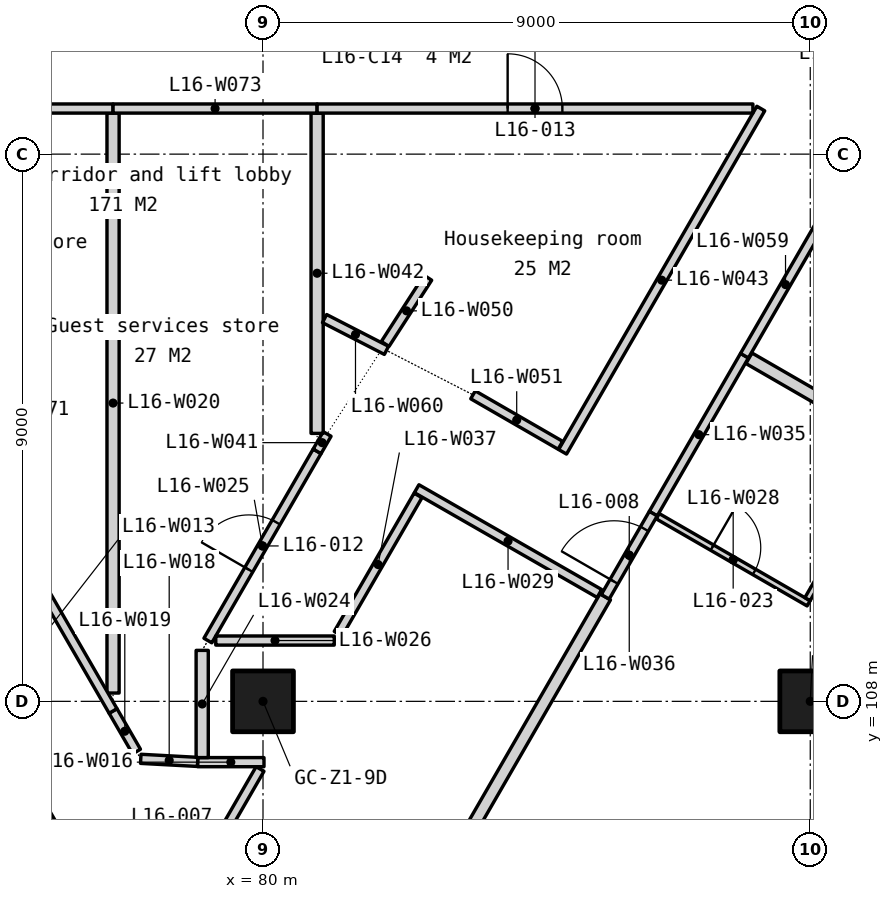
"""IFC4 building model, lengths in metres.
Left out: names, types, materials, properties, quantities, classifications, styles, units other than length and angle.
Written with IfcOpenShell. Run it as: python <this file> out.ifc"""

import sys

from ifc_helpers import new_model, si_unit, direction, frame, frame_2d, origin, origin_2d, place, context, subcontext, project, spatial, polyline, rectangle, outline, extrude, element, fill, save


model = new_model("IFC4")
c1 = context("Model", 3, precision=1e-05, world=origin(), true_north=direction((0.0, 1.0)))
c2 = subcontext(c1, "Body", "Model", "MODEL_VIEW")
j1 = project(units=[si_unit("LENGTHUNIT", "METRE"), si_unit("PLANEANGLEUNIT", "RADIAN")], contexts=[c1])
p1 = place(None, origin())
s1 = spatial("IfcSite", under=j1, at=p1, CompositionType="ELEMENT")
p2 = place(p1, origin())
s2 = spatial("IfcBuilding", under=s1, at=p2, CompositionType="ELEMENT")
p3 = place(p2, frame((0.0, 0.0, 70.0)))
s3 = spatial("IfcBuildingStorey", under=s2, at=p3, CompositionType="ELEMENT", Elevation=70.0)
for number, where, z_axis, x_axis in (
    (1, (80.0, 108.0, 0.0), (0.0, 0.0, 1.0), (1.0, 0.0, 0.0)),
    (2, (89.0, 108.0, 0.0), (0.0, 0.0, 1.0), (1.0, 0.0, 0.0)),
):
    element("IfcColumn", number, at=place(p3, frame(where, z_axis=z_axis, x_axis=x_axis)), inside=s3, PredefinedType="COLUMN", context=c2, shape_type="SweptSolid", body=[
        extrude(rectangle(XDim=1.0, YDim=1.0, at=origin_2d()), origin(), (0.0, 0.0, 1.0), 3.5),
    ])
p4 = place(p3, frame((54.495, 129.397, -0.15), z_axis=(0.0, 0.0, 1.0), x_axis=(0.499999201451, -0.866025864826, 0.0)))
e3 = element("IfcWall", 3, at=p4, inside=s3, PredefinedType="SOLIDWALL", context=c2, shape_type="SweptSolid", body=[
    extrude(outline(polyline([(44.8, 0.0), (44.8, 3.5), (0.0, 3.5), (0.0, 0.0), (44.8, 0.0)])), frame((0.0, 0.225, 0.0), z_axis=(0.0, -1.0, 0.0), x_axis=(1.0, 0.0, 0.0)), (0.0, 0.0, 1.0), 0.45),
])
p5 = place(p4, frame((0.786, 0.0, 1.05)))
e4 = element("IfcOpeningElement", 4, at=p5, cuts=e3, PredefinedType="OPENING", context=c2, shape_type="SweptSolid", body=[
    extrude(rectangle(XDim=1.2, YDim=1.5, at=frame_2d((0.6, 0.75))), frame((0.0, 0.235, 0.0), z_axis=(0.0, -1.0, 0.0), x_axis=(1.0, 0.0, 0.0)), (0.0, 0.0, 1.0), 0.47),
])
p6 = place(p4, frame((6.91, 0.0, 1.05)))
e5 = element("IfcOpeningElement", 5, at=p6, cuts=e3, PredefinedType="OPENING", context=c2, shape_type="SweptSolid", body=[
    extrude(rectangle(XDim=1.8, YDim=1.5, at=frame_2d((0.9, 0.75))), frame((0.0, 0.235, 0.0), z_axis=(0.0, -1.0, 0.0), x_axis=(1.0, 0.0, 0.0)), (0.0, 0.0, 1.0), 0.47),
])
p7 = place(p4, frame((9.21, 0.0, 1.05)))
e6 = element("IfcOpeningElement", 6, at=p7, cuts=e3, PredefinedType="OPENING", context=c2, shape_type="SweptSolid", body=[
    extrude(rectangle(XDim=1.8, YDim=1.5, at=frame_2d((0.9, 0.75))), frame((0.0, 0.235, 0.0), z_axis=(0.0, -1.0, 0.0), x_axis=(1.0, 0.0, 0.0)), (0.0, 0.0, 1.0), 0.47),
])
p8 = place(p4, frame((15.87, 0.0, 1.05)))
e7 = element("IfcOpeningElement", 7, at=p8, cuts=e3, PredefinedType="OPENING", context=c2, shape_type="SweptSolid", body=[
    extrude(rectangle(XDim=1.8, YDim=1.5, at=frame_2d((0.9, 0.75))), frame((0.0, 0.235, 0.0), z_axis=(0.0, -1.0, 0.0), x_axis=(1.0, 0.0, 0.0)), (0.0, 0.0, 1.0), 0.47),
])
p9 = place(p4, frame((18.17, 0.0, 1.05)))
e8 = element("IfcOpeningElement", 8, at=p9, cuts=e3, PredefinedType="OPENING", context=c2, shape_type="SweptSolid", body=[
    extrude(rectangle(XDim=1.8, YDim=1.5, at=frame_2d((0.9, 0.75))), frame((0.0, 0.235, 0.0), z_axis=(0.0, -1.0, 0.0), x_axis=(1.0, 0.0, 0.0)), (0.0, 0.0, 1.0), 0.47),
])
p10 = place(p4, frame((24.83, 0.0, 1.05)))
e9 = element("IfcOpeningElement", 9, at=p10, cuts=e3, PredefinedType="OPENING", context=c2, shape_type="SweptSolid", body=[
    extrude(rectangle(XDim=1.8, YDim=1.5, at=frame_2d((0.9, 0.75))), frame((0.0, 0.235, 0.0), z_axis=(0.0, -1.0, 0.0), x_axis=(1.0, 0.0, 0.0)), (0.0, 0.0, 1.0), 0.47),
])
p11 = place(p4, frame((27.13, 0.0, 1.05)))
e10 = element("IfcOpeningElement", 10, at=p11, cuts=e3, PredefinedType="OPENING", context=c2, shape_type="SweptSolid", body=[
    extrude(rectangle(XDim=1.8, YDim=1.5, at=frame_2d((0.9, 0.75))), frame((0.0, 0.235, 0.0), z_axis=(0.0, -1.0, 0.0), x_axis=(1.0, 0.0, 0.0)), (0.0, 0.0, 1.0), 0.47),
])
p12 = place(p4, frame((33.79, 0.0, 1.05)))
e11 = element("IfcOpeningElement", 11, at=p12, cuts=e3, PredefinedType="OPENING", context=c2, shape_type="SweptSolid", body=[
    extrude(rectangle(XDim=1.8, YDim=1.5, at=frame_2d((0.9, 0.75))), frame((0.0, 0.235, 0.0), z_axis=(0.0, -1.0, 0.0), x_axis=(1.0, 0.0, 0.0)), (0.0, 0.0, 1.0), 0.47),
])
p13 = place(p4, frame((36.09, 0.0, 1.05)))
e12 = element("IfcOpeningElement", 12, at=p13, cuts=e3, PredefinedType="OPENING", context=c2, shape_type="SweptSolid", body=[
    extrude(rectangle(XDim=1.8, YDim=1.5, at=frame_2d((0.9, 0.75))), frame((0.0, 0.235, 0.0), z_axis=(0.0, -1.0, 0.0), x_axis=(1.0, 0.0, 0.0)), (0.0, 0.0, 1.0), 0.47),
])
p14 = place(p4, frame((42.814, 0.0, 1.05)))
e13 = element("IfcOpeningElement", 13, at=p14, cuts=e3, PredefinedType="OPENING", context=c2, shape_type="SweptSolid", body=[
    extrude(rectangle(XDim=1.2, YDim=1.5, at=frame_2d((0.6, 0.75))), frame((0.0, 0.235, 0.0), z_axis=(0.0, -1.0, 0.0), x_axis=(1.0, 0.0, 0.0)), (0.0, 0.0, 1.0), 0.47),
])
p15 = place(p3, frame((88.435, 99.831, -0.15), z_axis=(0.0, 0.0, 1.0), x_axis=(0.500000806382, 0.866024938219, 0.0)))
e14 = element("IfcWall", 14, at=p15, inside=s3, PredefinedType="SOLIDWALL", context=c2, shape_type="SweptSolid", body=[
    extrude(outline(polyline([(34.14, 3.5), (34.14, 0.0), (0.0, 0.0), (0.0, 3.5), (34.14, 3.5)])), frame((0.0, 0.225, 0.0), z_axis=(0.0, -1.0, 0.0), x_axis=(1.0, 0.0, 0.0)), (0.0, 0.0, 1.0), 0.45),
])
p16 = place(p15, frame((5.21, 0.0, 1.05)))
e15 = element("IfcOpeningElement", 15, at=p16, cuts=e14, PredefinedType="OPENING", context=c2, shape_type="SweptSolid", body=[
    extrude(rectangle(XDim=1.8, YDim=1.5, at=frame_2d((0.9, 0.75))), frame((0.0, 0.235, 0.0), z_axis=(0.0, -1.0, 0.0), x_axis=(1.0, 0.0, 0.0)), (0.0, 0.0, 1.0), 0.47),
])
p17 = place(p15, frame((7.51, 0.0, 1.05)))
e16 = element("IfcOpeningElement", 16, at=p17, cuts=e14, PredefinedType="OPENING", context=c2, shape_type="SweptSolid", body=[
    extrude(rectangle(XDim=1.8, YDim=1.5, at=frame_2d((0.9, 0.75))), frame((0.0, 0.235, 0.0), z_axis=(0.0, -1.0, 0.0), x_axis=(1.0, 0.0, 0.0)), (0.0, 0.0, 1.0), 0.47),
])
p18 = place(p15, frame((14.17, 0.0, 1.05)))
e17 = element("IfcOpeningElement", 17, at=p18, cuts=e14, PredefinedType="OPENING", context=c2, shape_type="SweptSolid", body=[
    extrude(rectangle(XDim=1.8, YDim=1.5, at=frame_2d((0.9, 0.75))), frame((0.0, 0.235, 0.0), z_axis=(0.0, -1.0, 0.0), x_axis=(1.0, 0.0, 0.0)), (0.0, 0.0, 1.0), 0.47),
])
p19 = place(p15, frame((16.47, 0.0, 1.05)))
e18 = element("IfcOpeningElement", 18, at=p19, cuts=e14, PredefinedType="OPENING", context=c2, shape_type="SweptSolid", body=[
    extrude(rectangle(XDim=1.8, YDim=1.5, at=frame_2d((0.9, 0.75))), frame((0.0, 0.235, 0.0), z_axis=(0.0, -1.0, 0.0), x_axis=(1.0, 0.0, 0.0)), (0.0, 0.0, 1.0), 0.47),
])
p20 = place(p15, frame((23.13, 0.0, 1.05)))
e19 = element("IfcOpeningElement", 19, at=p20, cuts=e14, PredefinedType="OPENING", context=c2, shape_type="SweptSolid", body=[
    extrude(rectangle(XDim=1.8, YDim=1.5, at=frame_2d((0.9, 0.75))), frame((0.0, 0.235, 0.0), z_axis=(0.0, -1.0, 0.0), x_axis=(1.0, 0.0, 0.0)), (0.0, 0.0, 1.0), 0.47),
])
p21 = place(p15, frame((25.43, 0.0, 1.05)))
e20 = element("IfcOpeningElement", 20, at=p21, cuts=e14, PredefinedType="OPENING", context=c2, shape_type="SweptSolid", body=[
    extrude(rectangle(XDim=1.8, YDim=1.5, at=frame_2d((0.9, 0.75))), frame((0.0, 0.235, 0.0), z_axis=(0.0, -1.0, 0.0), x_axis=(1.0, 0.0, 0.0)), (0.0, 0.0, 1.0), 0.47),
])
p22 = place(p15, frame((32.154, 0.0, 1.05)))
e21 = element("IfcOpeningElement", 21, at=p22, cuts=e14, PredefinedType="OPENING", context=c2, shape_type="SweptSolid", body=[
    extrude(rectangle(XDim=1.2, YDim=1.5, at=frame_2d((0.6, 0.75))), frame((0.0, 0.235, 0.0), z_axis=(0.0, -1.0, 0.0), x_axis=(1.0, 0.0, 0.0)), (0.0, 0.0, 1.0), 0.47),
])
p23 = place(p3, frame((80.087, 100.121, 0.0), z_axis=(0.0, 0.0, 1.0), x_axis=(0.500000851129, 0.866024912384, 0.0)))
e22 = element("IfcWall", 22, at=p23, inside=s3, PredefinedType="PARTITIONING", context=c2, shape_type="SweptSolid", body=[
    extrude(rectangle(XDim=11.083, YDim=0.2, at=frame_2d((5.542, 0.0))), origin(), (0.0, 0.0, 1.0), 3.35),
])
p24 = place(p3, frame((74.322, 109.805, 0.0), z_axis=(0.0, 0.0, 1.0), x_axis=(0.500013360201, -0.866017690131, 0.0)))
e23 = element("IfcWall", 23, at=p24, inside=s3, PredefinedType="PARTITIONING", context=c2, shape_type="SweptSolid", body=[
    extrude(rectangle(XDim=4.48, YDim=0.15, at=frame_2d((2.24, 0.0))), origin(), (0.0, 0.0, 1.0), 3.35),
])
p25 = place(p24, frame((0.896, 0.0, 0.0)))
e24 = element("IfcOpeningElement", 24, at=p25, cuts=e23, PredefinedType="OPENING", context=c2, shape_type="SweptSolid", body=[
    extrude(rectangle(XDim=0.9, YDim=2.1, at=frame_2d((0.45, 1.05))), frame((0.0, 0.085, 0.0), z_axis=(0.0, -1.0, 0.0), x_axis=(1.0, 0.0, 0.0)), (0.0, 0.0, 1.0), 0.17),
])
p26 = place(p3, frame((78.925, 107.0, 0.0), z_axis=(0.0, 0.0, 1.0), x_axis=(1.0, 0.0, 0.0)))
e25 = element("IfcWall", 25, at=p26, inside=s3, PredefinedType="PARTITIONING", context=c2, shape_type="SweptSolid", body=[
    extrude(rectangle(XDim=1.091, YDim=0.15, at=frame_2d((0.545, 0.0))), origin(), (0.0, 0.0, 1.0), 3.35),
])
p27 = place(p3, frame((78.044, 103.583, 0.0), z_axis=(0.0, 0.0, 1.0), x_axis=(0.499835090783, 0.866120593233, 0.0)))
e26 = element("IfcWall", 26, at=p27, inside=s3, PredefinedType="PARTITIONING", context=c2, shape_type="SweptSolid", body=[
    extrude(rectangle(XDim=3.815, YDim=0.15, at=frame_2d((1.908, 0.0))), origin(), (0.0, 0.0, 1.0), 3.35),
])
p28 = place(p27, frame((1.408, 0.0, 0.0)))
e27 = element("IfcOpeningElement", 27, at=p28, cuts=e26, PredefinedType="OPENING", context=c2, shape_type="SweptSolid", body=[
    extrude(rectangle(XDim=1.0, YDim=2.1, at=frame_2d((0.5, 1.05))), frame((0.0, 0.085, 0.0), z_axis=(0.0, -1.0, 0.0), x_axis=(1.0, 0.0, 0.0)), (0.0, 0.0, 1.0), 0.17),
])
p29 = place(p3, frame((77.99, 107.055, 0.0), z_axis=(0.0, 0.0, 1.0), x_axis=(0.998544170551, -0.053940147, 0.0)))
e28 = element("IfcWall", 28, at=p29, inside=s3, PredefinedType="PARTITIONING", context=c2, shape_type="SweptSolid", body=[
    extrude(rectangle(XDim=0.937, YDim=0.15, at=frame_2d((0.469, 0.0))), origin(), (0.0, 0.0, 1.0), 3.35),
])
p30 = place(p3, frame((77.534, 107.842, 0.0), z_axis=(0.0, 0.0, 1.0), x_axis=(0.500973854789, -0.865462417912, 0.0)))
e29 = element("IfcWall", 29, at=p30, inside=s3, PredefinedType="PARTITIONING", context=c2, shape_type="SweptSolid", body=[
    extrude(rectangle(XDim=0.771, YDim=0.15, at=frame_2d((0.385, 0.0))), origin(), (0.0, 0.0, 1.0), 3.35),
])
p31 = place(p3, frame((77.534, 108.137, 0.0), z_axis=(0.0, 0.0, 1.0), x_axis=(0.0, 1.0, 0.0)))
e30 = element("IfcWall", 30, at=p31, inside=s3, PredefinedType="PARTITIONING", context=c2, shape_type="SweptSolid", body=[
    extrude(rectangle(XDim=9.538, YDim=0.2, at=frame_2d((4.769, 0.0))), origin(), (0.0, 0.0, 1.0), 3.35),
])
p32 = place(p3, frame((79.0, 107.075, 0.0), z_axis=(0.0, 0.0, 1.0), x_axis=(0.0, 1.0, 0.0)))
e31 = element("IfcWall", 31, at=p32, inside=s3, PredefinedType="PARTITIONING", context=c2, shape_type="SweptSolid", body=[
    extrude(rectangle(XDim=1.763, YDim=0.2, at=frame_2d((0.882, 0.0))), origin(), (0.0, 0.0, 1.0), 3.35),
])
p33 = place(p3, frame((79.093, 109.0, 0.0), z_axis=(0.0, 0.0, 1.0), x_axis=(0.499975343382, 0.866039638822, 0.0)))
e32 = element("IfcWall", 32, at=p33, inside=s3, PredefinedType="PARTITIONING", context=c2, shape_type="SweptSolid", body=[
    extrude(rectangle(XDim=3.594, YDim=0.15, at=frame_2d((1.797, 0.0))), origin(), (0.0, 0.0, 1.0), 3.35),
])
p34 = place(p33, frame((1.347, 0.0, 0.0)))
e33 = element("IfcOpeningElement", 33, at=p34, cuts=e32, PredefinedType="OPENING", context=c2, shape_type="SweptSolid", body=[
    extrude(rectangle(XDim=0.9, YDim=2.1, at=frame_2d((0.45, 1.05))), frame((0.0, 0.085, 0.0), z_axis=(0.0, -1.0, 0.0), x_axis=(1.0, 0.0, 0.0)), (0.0, 0.0, 1.0), 0.17),
])
p35 = place(p3, frame((79.223, 109.0, 0.0), z_axis=(0.0, 0.0, 1.0), x_axis=(1.0, 0.0, 0.0)))
e34 = element("IfcWall", 34, at=p35, inside=s3, PredefinedType="PARTITIONING", context=c2, shape_type="SweptSolid", body=[
    extrude(rectangle(XDim=1.948, YDim=0.15, at=frame_2d((0.974, 0.0))), origin(), (0.0, 0.0, 1.0), 3.35),
])
p36 = place(p3, frame((86.492, 111.045, 0.0), z_axis=(0.0, 0.0, 1.0), x_axis=(0.866047940603, -0.499960963054, 0.0)))
e35 = element("IfcWall", 35, at=p36, inside=s3, PredefinedType="PARTITIONING", context=c2, shape_type="SweptSolid", body=[
    extrude(rectangle(XDim=2.865, YDim=0.1, at=frame_2d((1.433, 0.0))), origin(), (0.0, 0.0, 1.0), 3.35),
])
p37 = place(p36, frame((1.032, 0.0, 0.0)))
e36 = element("IfcOpeningElement", 36, at=p37, cuts=e35, PredefinedType="OPENING", context=c2, shape_type="SweptSolid", body=[
    extrude(rectangle(XDim=0.8, YDim=2.1, at=frame_2d((0.4, 1.05))), frame((0.0, 0.06, 0.0), z_axis=(0.0, -1.0, 0.0), x_axis=(1.0, 0.0, 0.0)), (0.0, 0.0, 1.0), 0.12),
])
p38 = place(p3, frame((82.527, 111.498, 0.0), z_axis=(0.0, 0.0, 1.0), x_axis=(0.867448529518, -0.497526932575, 0.0)))
e37 = element("IfcWall", 37, at=p38, inside=s3, PredefinedType="PARTITIONING", context=c2, shape_type="SweptSolid", body=[
    extrude(rectangle(XDim=3.465, YDim=0.15, at=frame_2d((1.732, 0.0))), origin(), (0.0, 0.0, 1.0), 3.35),
])
p39 = place(p3, frame((87.992, 113.643, 0.0), z_axis=(0.0, 0.0, 1.0), x_axis=(0.866033669941, -0.499985682323, 0.0)))
e38 = element("IfcWall", 38, at=p39, inside=s3, PredefinedType="PARTITIONING", context=c2, shape_type="SweptSolid", body=[
    extrude(rectangle(XDim=7.065, YDim=0.2, at=frame_2d((3.533, 0.0))), origin(), (0.0, 0.0, 1.0), 3.35),
])
p40 = place(p3, frame((86.418, 111.087, 0.0), z_axis=(0.0, 0.0, 1.0), x_axis=(0.499990139034, 0.866031096941, 0.0)))
e39 = element("IfcWall", 39, at=p40, inside=s3, PredefinedType="PARTITIONING", context=c2, shape_type="SweptSolid", body=[
    extrude(rectangle(XDim=3.0, YDim=0.15, at=frame_2d((1.5, 0.0))), origin(), (0.0, 0.0, 1.0), 3.35),
])
p41 = place(p3, frame((85.628, 109.719, 0.0), z_axis=(0.0, 0.0, 1.0), x_axis=(0.499994407638, 0.866028632512, 0.0)))
e40 = element("IfcWall", 40, at=p41, inside=s3, PredefinedType="PARTITIONING", context=c2, shape_type="SweptSolid", body=[
    extrude(rectangle(XDim=1.58, YDim=0.15, at=frame_2d((0.79, 0.0))), origin(), (0.0, 0.0, 1.0), 3.35),
])
p42 = place(p41, frame((0.29, 0.0, 0.0)))
e41 = element("IfcOpeningElement", 41, at=p42, cuts=e40, PredefinedType="OPENING", context=c2, shape_type="SweptSolid", body=[
    extrude(rectangle(XDim=1.0, YDim=2.1, at=frame_2d((0.5, 1.05))), frame((0.0, 0.085, 0.0), z_axis=(0.0, -1.0, 0.0), x_axis=(1.0, 0.0, 0.0)), (0.0, 0.0, 1.0), 0.17),
])
p43 = place(p3, frame((81.237, 109.113, 0.0), z_axis=(0.0, 0.0, 1.0), x_axis=(0.500039022115, 0.866002873184, 0.0)))
e42 = element("IfcWall", 42, at=p43, inside=s3, PredefinedType="PARTITIONING", context=c2, shape_type="SweptSolid", body=[
    extrude(rectangle(XDim=2.626, YDim=0.15, at=frame_2d((1.313, 0.0))), origin(), (0.0, 0.0, 1.0), 3.35),
])
p44 = place(p3, frame((80.89, 112.112, 0.0), z_axis=(0.0, 0.0, 1.0), x_axis=(0.500598341109, 0.865679675676, 0.0)))
e43 = element("IfcWall", 43, at=p44, inside=s3, PredefinedType="PARTITIONING", context=c2, shape_type="SweptSolid", body=[
    extrude(rectangle(XDim=0.33, YDim=0.15, at=frame_2d((0.165, 0.0))), origin(), (0.0, 0.0, 1.0), 3.35),
])
p45 = place(p3, frame((80.89, 112.407, 0.0), z_axis=(0.0, 0.0, 1.0), x_axis=(0.0, 1.0, 0.0)))
e44 = element("IfcWall", 44, at=p45, inside=s3, PredefinedType="PARTITIONING", context=c2, shape_type="SweptSolid", body=[
    extrude(rectangle(XDim=5.268, YDim=0.2, at=frame_2d((2.634, 0.0))), origin(), (0.0, 0.0, 1.0), 3.35),
])
p46 = place(p3, frame((84.927, 112.104, 0.0), z_axis=(0.0, 0.0, 1.0), x_axis=(0.50000555188, 0.866022198381, 0.0)))
e45 = element("IfcWall", 45, at=p46, inside=s3, PredefinedType="PARTITIONING", context=c2, shape_type="SweptSolid", body=[
    extrude(rectangle(XDim=6.52, YDim=0.15, at=frame_2d((3.26, 0.0))), origin(), (0.0, 0.0, 1.0), 3.35),
])
p47 = place(p3, frame((88.955, 109.68, 0.0), z_axis=(0.0, 0.0, 1.0), x_axis=(0.499999279071, 0.866025820012, 0.0)))
e46 = element("IfcWall", 46, at=p47, inside=s3, PredefinedType="PARTITIONING", context=c2, shape_type="SweptSolid", body=[
    extrude(rectangle(XDim=2.85, YDim=0.1, at=frame_2d((1.425, 0.0))), origin(), (0.0, 0.0, 1.0), 3.35),
])
p48 = place(p3, frame((82.711, 114.967, 0.0), z_axis=(0.0, 0.0, 1.0), x_axis=(-0.541804893766, -0.840504287372, 0.0)))
e47 = element("IfcWall", 47, at=p48, inside=s3, PredefinedType="PARTITIONING", context=c2, shape_type="SweptSolid", body=[
    extrude(rectangle(XDim=1.295, YDim=0.15, at=frame_2d((0.648, 0.0))), origin(), (0.0, 0.0, 1.0), 3.35),
])
p49 = place(p3, frame((83.454, 113.041, 0.0), z_axis=(0.0, 0.0, 1.0), x_axis=(0.866006690807, -0.500032410427, 0.0)))
e48 = element("IfcWall", 48, at=p49, inside=s3, PredefinedType="PARTITIONING", context=c2, shape_type="SweptSolid", body=[
    extrude(rectangle(XDim=1.659, YDim=0.15, at=frame_2d((0.83, 0.0))), origin(), (0.0, 0.0, 1.0), 3.35),
])
p50 = place(p3, frame((87.918, 113.685, 0.0), z_axis=(0.0, 0.0, 1.0), x_axis=(0.500048589285, 0.86599734893, 0.0)))
e49 = element("IfcWall", 49, at=p50, inside=s3, PredefinedType="PARTITIONING", context=c2, shape_type="SweptSolid", body=[
    extrude(rectangle(XDim=2.7, YDim=0.15, at=frame_2d((1.35, 0.0))), origin(), (0.0, 0.0, 1.0), 3.35),
])
p51 = place(p3, frame((82.03, 113.772, 0.0), z_axis=(0.0, 0.0, 1.0), x_axis=(-0.88951078583, 0.456914173441, 0.0)))
e50 = element("IfcWall", 50, at=p51, inside=s3, PredefinedType="PARTITIONING", context=c2, shape_type="SweptSolid", body=[
    extrude(rectangle(XDim=1.145, YDim=0.15, at=frame_2d((0.572, 0.0))), origin(), (0.0, 0.0, 1.0), 3.35),
])
p52 = place(p3, frame((71.813, 117.75, 0.0), z_axis=(0.0, 0.0, 1.0), x_axis=(0.499997066004, -0.866027097721, 0.0)))
e51 = element("IfcWall", 51, at=p52, inside=s3, PredefinedType="PARTITIONING", context=c2, shape_type="SweptSolid", body=[
    extrude(rectangle(XDim=11.441, YDim=0.15, at=frame_2d((5.72, 0.0))), origin(), (0.0, 0.0, 1.0), 3.35),
])
p53 = place(p52, frame((5.271, 0.0, 0.0)))
e52 = element("IfcOpeningElement", 52, at=p53, cuts=e51, PredefinedType="OPENING", context=c2, shape_type="SweptSolid", body=[
    extrude(rectangle(XDim=0.9, YDim=2.1, at=frame_2d((0.45, 1.05))), frame((0.0, 0.085, 0.0), z_axis=(0.0, -1.0, 0.0), x_axis=(1.0, 0.0, 0.0)), (0.0, 0.0, 1.0), 0.17),
])
p54 = place(p3, frame((71.943, 117.75, 0.0), z_axis=(0.0, 0.0, 1.0), x_axis=(1.0, 0.0, 0.0)))
e53 = element("IfcWall", 53, at=p54, inside=s3, PredefinedType="PARTITIONING", context=c2, shape_type="SweptSolid", body=[
    extrude(rectangle(XDim=5.591, YDim=0.15, at=frame_2d((2.795, 0.0))), origin(), (0.0, 0.0, 1.0), 3.35),
])
p55 = place(p3, frame((77.534, 117.75, 0.0), z_axis=(0.0, 0.0, 1.0), x_axis=(1.0, 0.0, 0.0)))
e54 = element("IfcWall", 54, at=p55, inside=s3, PredefinedType="PARTITIONING", context=c2, shape_type="SweptSolid", body=[
    extrude(rectangle(XDim=3.356, YDim=0.15, at=frame_2d((1.678, 0.0))), origin(), (0.0, 0.0, 1.0), 3.35),
])
p56 = place(p3, frame((80.89, 117.75, 0.0), z_axis=(0.0, 0.0, 1.0), x_axis=(1.0, 0.0, 0.0)))
e55 = element("IfcWall", 55, at=p56, inside=s3, PredefinedType="PARTITIONING", context=c2, shape_type="SweptSolid", body=[
    extrude(rectangle(XDim=7.167, YDim=0.15, at=frame_2d((3.583, 0.0))), origin(), (0.0, 0.0, 1.0), 3.35),
])
p57 = place(p56, frame((3.133, 0.0, 0.0)))
e56 = element("IfcOpeningElement", 56, at=p57, cuts=e55, PredefinedType="OPENING", context=c2, shape_type="SweptSolid", body=[
    extrude(rectangle(XDim=0.9, YDim=2.1, at=frame_2d((0.45, 1.05))), frame((0.0, 0.085, 0.0), z_axis=(0.0, -1.0, 0.0), x_axis=(1.0, 0.0, 0.0)), (0.0, 0.0, 1.0), 0.17),
])
p58 = place(p42, origin())
e57 = element("IfcDoor", 57, at=p58, inside=s3, OperationType="SINGLE_SWING_LEFT", PredefinedType="DOOR", context=c2, shape_type="SweptSolid", body=[
    extrude(rectangle(XDim=1.0, YDim=2.1, at=frame_2d((0.5, 1.05))), frame((0.0, 0.025, 0.0), z_axis=(0.0, -1.0, 0.0), x_axis=(1.0, 0.0, 0.0)), (0.0, 0.0, 1.0), 0.05),
])
fill(e41, e57)
p59 = place(p34, origin())
e58 = element("IfcDoor", 58, at=p59, inside=s3, OperationType="SINGLE_SWING_LEFT", PredefinedType="DOOR", context=c2, shape_type="SweptSolid", body=[
    extrude(rectangle(XDim=0.9, YDim=2.1, at=frame_2d((0.45, 1.05))), frame((0.0, 0.025, 0.0), z_axis=(0.0, -1.0, 0.0), x_axis=(1.0, 0.0, 0.0)), (0.0, 0.0, 1.0), 0.05),
])
fill(e33, e58)
p60 = place(p57, origin())
e59 = element("IfcDoor", 59, at=p60, inside=s3, OperationType="SINGLE_SWING_LEFT", PredefinedType="DOOR", context=c2, shape_type="SweptSolid", body=[
    extrude(rectangle(XDim=0.9, YDim=2.1, at=frame_2d((0.45, 1.05))), frame((0.0, 0.025, 0.0), z_axis=(0.0, -1.0, 0.0), x_axis=(1.0, 0.0, 0.0)), (0.0, 0.0, 1.0), 0.05),
])
fill(e56, e59)
p61 = place(p37, origin())
e60 = element("IfcDoor", 60, at=p61, inside=s3, OperationType="SINGLE_SWING_LEFT", PredefinedType="DOOR", context=c2, shape_type="SweptSolid", body=[
    extrude(rectangle(XDim=0.8, YDim=2.1, at=frame_2d((0.4, 1.05))), frame((0.0, 0.025, 0.0), z_axis=(0.0, -1.0, 0.0), x_axis=(1.0, 0.0, 0.0)), (0.0, 0.0, 1.0), 0.05),
])
fill(e36, e60)
save(model, sys.argv[1])
